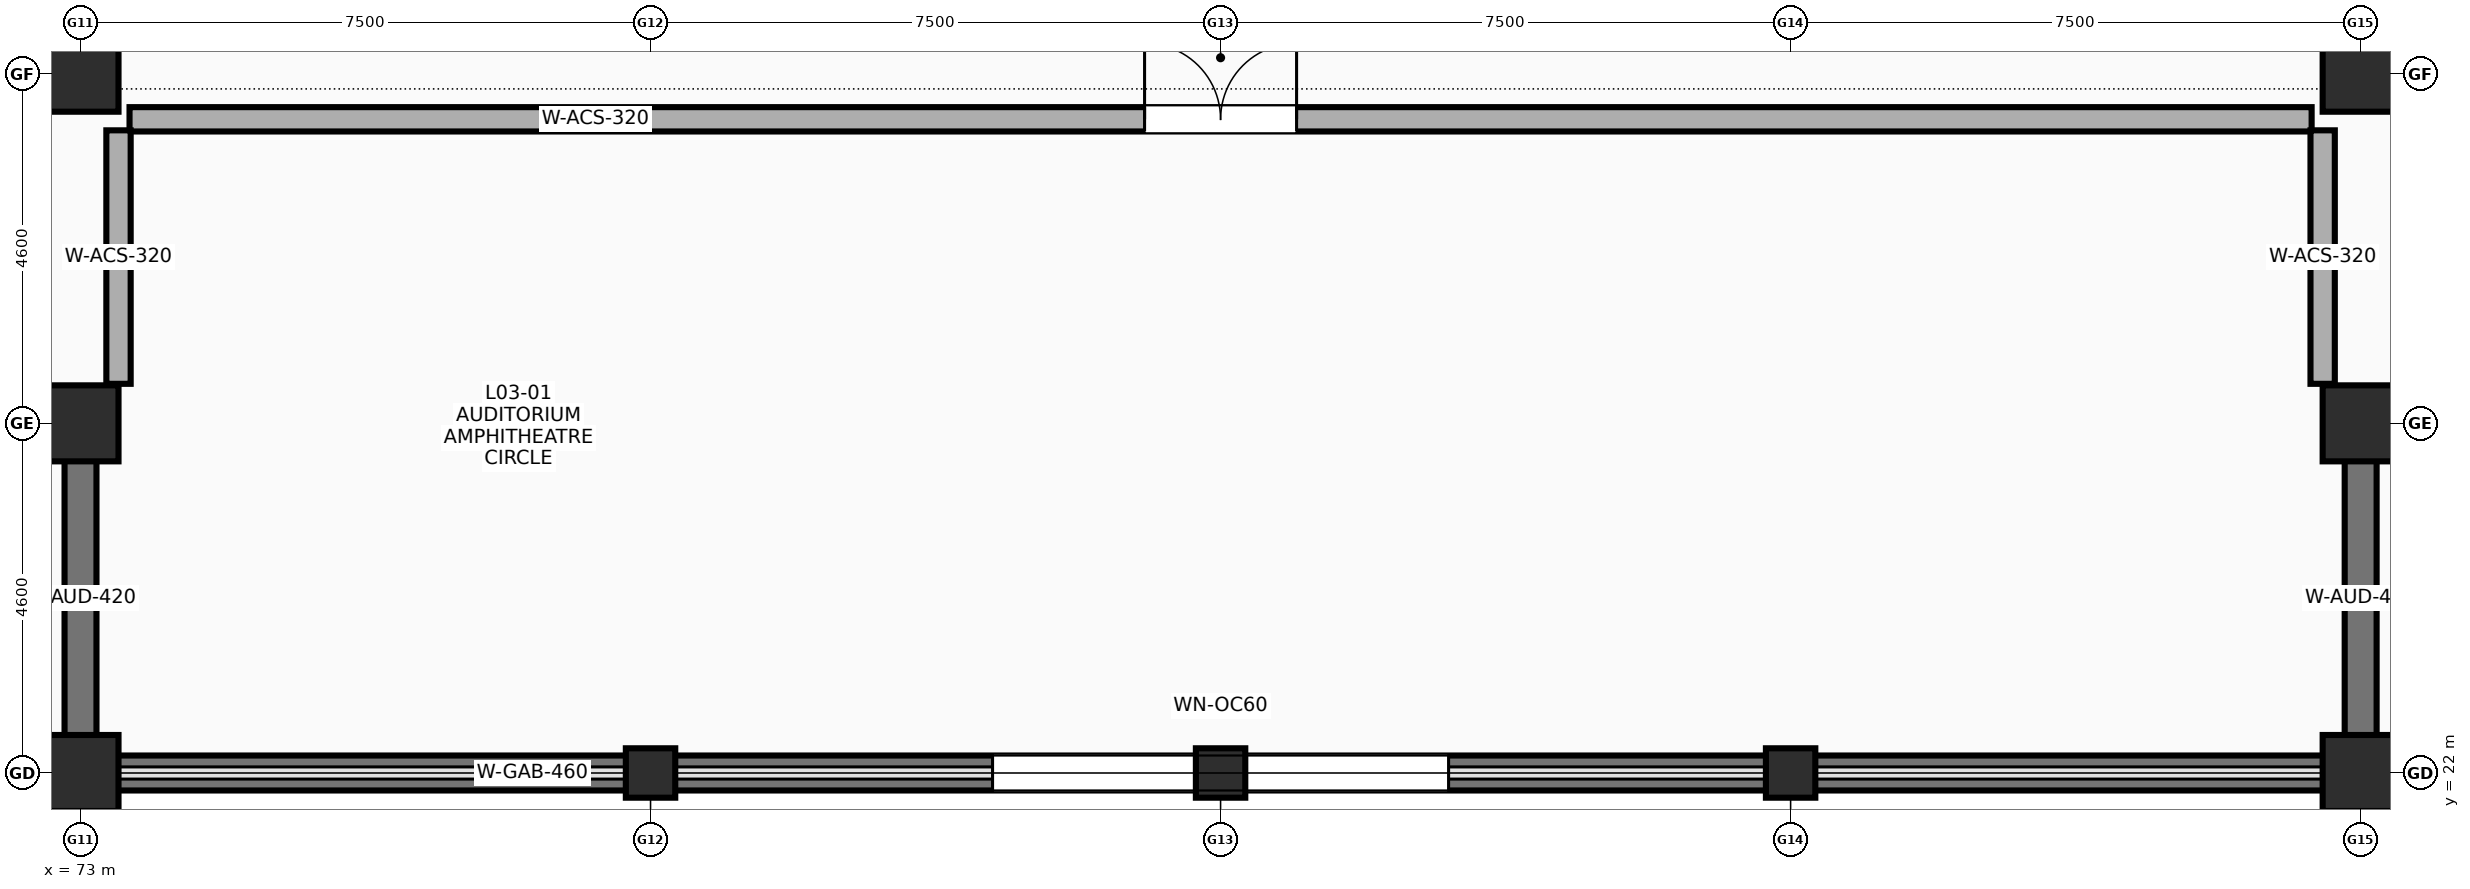
"""IFC4 building model, lengths in metres.
Left out: names, types, materials, properties, quantities, classifications, styles, units other than length and angle.
Written with IfcOpenShell. Run it as: python <this file> out.ifc"""

import sys

from ifc_helpers import new_model, si_unit, direction, frame, frame_2d, origin, origin_2d, place, context, subcontext, project, spatial, polyline, rectangle, outline, extrude, element, fill, save


model = new_model("IFC4")
c1 = context("Model", 3, precision=1e-05, world=origin(), true_north=direction((0.0, 1.0)))
c2 = subcontext(c1, "Body", "Model", "MODEL_VIEW")
j1 = project(units=[si_unit("LENGTHUNIT", "METRE"), si_unit("PLANEANGLEUNIT", "RADIAN")], contexts=[c1])
p1 = place(None, origin())
s1 = spatial("IfcSite", under=j1, at=p1, CompositionType="ELEMENT")
p2 = place(p1, origin())
s2 = spatial("IfcBuilding", under=s1, at=p2, CompositionType="ELEMENT")
p3 = place(p2, frame((0.0, 0.0, 14.2)))
s3 = spatial("IfcBuildingStorey", under=s2, at=p3, CompositionType="ELEMENT", Elevation=14.2)
for number, where, z_axis, x_axis in (
    (1, (73.0, 22.0, 0.0), (0.0, 0.0, 1.0), (1.0, 0.0, 0.0)),
    (2, (73.0, 26.6, 0.0), (0.0, 0.0, 1.0), (1.0, 0.0, 0.0)),
    (3, (73.0, 31.2, 0.0), (0.0, 0.0, 1.0), (1.0, 0.0, 0.0)),
):
    element("IfcColumn", number, at=place(p3, frame(where, z_axis=z_axis, x_axis=x_axis)), inside=s3, PredefinedType="COLUMN", context=c2, shape_type="SweptSolid", body=[
        extrude(rectangle(XDim=1.0, YDim=1.0, at=origin_2d()), origin(), (0.0, 0.0, 1.0), 3.8),
    ])
for number, where, z_axis, x_axis in (
    (4, (80.5, 22.0, 0.0), (0.0, 0.0, 1.0), (1.0, 0.0, 0.0)),
    (5, (88.0, 22.0, 0.0), (0.0, 0.0, 1.0), (1.0, 0.0, 0.0)),
    (6, (95.5, 22.0, 0.0), (0.0, 0.0, 1.0), (1.0, 0.0, 0.0)),
):
    element("IfcColumn", number, at=place(p3, frame(where, z_axis=z_axis, x_axis=x_axis)), inside=s3, PredefinedType="COLUMN", context=c2, shape_type="SweptSolid", body=[
        extrude(rectangle(XDim=0.65, YDim=0.65, at=origin_2d()), origin(), (0.0, 0.0, 1.0), 3.8),
    ])
for number, where, z_axis, x_axis in (
    (7, (103.0, 22.0, 0.0), (0.0, 0.0, 1.0), (1.0, 0.0, 0.0)),
    (8, (103.0, 26.6, 0.0), (0.0, 0.0, 1.0), (1.0, 0.0, 0.0)),
    (9, (103.0, 31.2, 0.0), (0.0, 0.0, 1.0), (1.0, 0.0, 0.0)),
):
    element("IfcColumn", number, at=place(p3, frame(where, z_axis=z_axis, x_axis=x_axis)), inside=s3, PredefinedType="COLUMN", context=c2, shape_type="SweptSolid", body=[
        extrude(rectangle(XDim=1.0, YDim=1.0, at=origin_2d()), origin(), (0.0, 0.0, 1.0), 3.8),
    ])
for number, where, z_axis, x_axis in (
    (10, (73.0, 22.49, 0.0), (0.0, 0.0, 1.0), (0.0, 1.0, 0.0)),
    (11, (103.0, 22.49, 0.0), (0.0, 0.0, 1.0), (0.0, 1.0, 0.0)),
):
    element("IfcWall", number, at=place(p3, frame(where, z_axis=z_axis, x_axis=x_axis)), inside=s3, PredefinedType="SHEAR", context=c2, shape_type="SweptSolid", body=[
        extrude(rectangle(XDim=3.62, YDim=0.42, at=frame_2d((1.81, 0.0))), origin(), (0.0, 0.0, 1.0), 3.8),
    ])
p4 = place(p3, frame((43.14, 22.0, 3.8), z_axis=(0.0, 0.0, 1.0), x_axis=(1.0, 0.0, 0.0)))
e12 = element("IfcWall", 12, at=p4, inside=s3, PredefinedType="SOLIDWALL", context=c2, shape_type="SweptSolid", body=[
    extrude(outline(polyline([(0.0, 0.0), (29.72, 0.0), (29.72, 2.177), (28.877, 3.859), (28.092, 5.46), (27.125, 6.958), (25.99, 8.333), (24.701, 9.565), (23.277, 10.637), (21.737, 11.536), (20.102, 12.248), (18.395, 12.763), (16.64, 13.076), (14.86, 13.18), (13.08, 13.076), (11.325, 12.763), (9.618, 12.248), (7.983, 11.536), (6.443, 10.637), (5.019, 9.565), (3.73, 8.333), (2.595, 6.958), (1.628, 5.46), (0.843, 3.859), (0.0, 2.177), (0.0, 0.0)])), frame((0.0, 0.23, 0.0), z_axis=(0.0, -1.0, 0.0), x_axis=(1.0, 0.0, 0.0)), (0.0, 0.0, 1.0), 0.46),
])
p5 = place(p4, frame((11.86, 0.0, 3.6)))
e13 = element("IfcOpeningElement", 13, at=p5, cuts=e12, PredefinedType="OPENING", context=c2, shape_type="SweptSolid", body=[
    extrude(outline(polyline([(6.0, 3.0), (5.898, 3.776), (5.598, 4.5), (5.121, 5.121), (4.5, 5.598), (3.776, 5.898), (3.0, 6.0), (2.224, 5.898), (1.5, 5.598), (0.879, 5.121), (0.402, 4.5), (0.102, 3.776), (0.0, 3.0), (0.102, 2.224), (0.402, 1.5), (0.879, 0.879), (1.5, 0.402), (2.224, 0.102), (3.0, 0.0), (3.776, 0.102), (4.5, 0.402), (5.121, 0.879), (5.598, 1.5), (5.898, 2.224), (6.0, 3.0)])), frame((0.0, 0.24, 0.0), z_axis=(0.0, -1.0, 0.0), x_axis=(1.0, 0.0, 0.0)), (0.0, 0.0, 1.0), 0.48),
])
p6 = place(p3, frame((73.14, 22.0, 3.8), z_axis=(0.0, 0.0, 1.0), x_axis=(1.0, 0.0, 0.0)))
e14 = element("IfcWall", 14, at=p6, inside=s3, PredefinedType="SOLIDWALL", context=c2, shape_type="SweptSolid", body=[
    extrude(outline(polyline([(0.0, 0.0), (29.72, 0.0), (29.72, 2.177), (28.877, 3.859), (28.092, 5.46), (27.125, 6.958), (25.99, 8.333), (24.701, 9.565), (23.277, 10.637), (21.737, 11.536), (20.102, 12.248), (18.395, 12.763), (16.64, 13.076), (14.86, 13.18), (13.08, 13.076), (11.325, 12.763), (9.618, 12.248), (7.983, 11.536), (6.443, 10.637), (5.019, 9.565), (3.73, 8.333), (2.595, 6.958), (1.628, 5.46), (0.843, 3.859), (0.0, 2.177), (0.0, 0.0)])), frame((0.0, 0.23, 0.0), z_axis=(0.0, -1.0, 0.0), x_axis=(1.0, 0.0, 0.0)), (0.0, 0.0, 1.0), 0.46),
])
p7 = place(p6, frame((11.86, 0.0, 3.6)))
e15 = element("IfcOpeningElement", 15, at=p7, cuts=e14, PredefinedType="OPENING", context=c2, shape_type="SweptSolid", body=[
    extrude(outline(polyline([(6.0, 3.0), (5.898, 3.776), (5.598, 4.5), (5.121, 5.121), (4.5, 5.598), (3.776, 5.898), (3.0, 6.0), (2.224, 5.898), (1.5, 5.598), (0.879, 5.121), (0.402, 4.5), (0.102, 3.776), (0.0, 3.0), (0.102, 2.224), (0.402, 1.5), (0.879, 0.879), (1.5, 0.402), (2.224, 0.102), (3.0, 0.0), (3.776, 0.102), (4.5, 0.402), (5.121, 0.879), (5.598, 1.5), (5.898, 2.224), (6.0, 3.0)])), frame((0.0, 0.24, 0.0), z_axis=(0.0, -1.0, 0.0), x_axis=(1.0, 0.0, 0.0)), (0.0, 0.0, 1.0), 0.48),
])
p8 = place(p3, frame((103.14, 22.0, 3.8), z_axis=(0.0, 0.0, 1.0), x_axis=(1.0, 0.0, 0.0)))
e16 = element("IfcWall", 16, at=p8, inside=s3, PredefinedType="SOLIDWALL", context=c2, shape_type="SweptSolid", body=[
    extrude(outline(polyline([(0.0, 0.0), (29.72, 0.0), (29.72, 2.177), (28.877, 3.859), (28.092, 5.46), (27.125, 6.958), (25.99, 8.333), (24.701, 9.565), (23.277, 10.637), (21.737, 11.536), (20.102, 12.248), (18.395, 12.763), (16.64, 13.076), (14.86, 13.18), (13.08, 13.076), (11.325, 12.763), (9.618, 12.248), (7.983, 11.536), (6.443, 10.637), (5.019, 9.565), (3.73, 8.333), (2.595, 6.958), (1.628, 5.46), (0.843, 3.859), (0.0, 2.177), (0.0, 0.0)])), frame((0.0, 0.23, 0.0), z_axis=(0.0, -1.0, 0.0), x_axis=(1.0, 0.0, 0.0)), (0.0, 0.0, 1.0), 0.46),
])
p9 = place(p8, frame((11.86, 0.0, 3.6)))
e17 = element("IfcOpeningElement", 17, at=p9, cuts=e16, PredefinedType="OPENING", context=c2, shape_type="SweptSolid", body=[
    extrude(outline(polyline([(6.0, 3.0), (5.898, 3.776), (5.598, 4.5), (5.121, 5.121), (4.5, 5.598), (3.776, 5.898), (3.0, 6.0), (2.224, 5.898), (1.5, 5.598), (0.879, 5.121), (0.402, 4.5), (0.102, 3.776), (0.0, 3.0), (0.102, 2.224), (0.402, 1.5), (0.879, 0.879), (1.5, 0.402), (2.224, 0.102), (3.0, 0.0), (3.776, 0.102), (4.5, 0.402), (5.121, 0.879), (5.598, 1.5), (5.898, 2.224), (6.0, 3.0)])), frame((0.0, 0.24, 0.0), z_axis=(0.0, -1.0, 0.0), x_axis=(1.0, 0.0, 0.0)), (0.0, 0.0, 1.0), 0.48),
])
p10 = place(p3, frame((73.645, 30.6, 0.0), z_axis=(0.0, 0.0, 1.0), x_axis=(1.0, 0.0, 0.0)))
e18 = element("IfcWall", 18, at=p10, inside=s3, PredefinedType="PARTITIONING", context=c2, shape_type="SweptSolid", body=[
    extrude(rectangle(XDim=28.71, YDim=0.32, at=frame_2d((14.355, 0.0))), origin(), (0.0, 0.0, 1.0), 2.38),
])
p11 = place(p10, frame((13.355, 0.0, 0.0)))
e19 = element("IfcOpeningElement", 19, at=p11, cuts=e18, PredefinedType="OPENING", context=c2, shape_type="SweptSolid", body=[
    extrude(rectangle(XDim=2.0, YDim=2.15, at=frame_2d((1.0, 1.075))), frame((0.0, 0.17, 0.0), z_axis=(0.0, -1.0, 0.0), x_axis=(1.0, 0.0, 0.0)), (0.0, 0.0, 1.0), 0.34),
])
for number, where, z_axis, x_axis in (
    (20, (73.5, 27.12, 0.0), (0.0, 0.0, 1.0), (0.0, 1.0, 0.0)),
    (21, (102.5, 27.12, 0.0), (0.0, 0.0, 1.0), (0.0, 1.0, 0.0)),
):
    element("IfcWall", number, at=place(p3, frame(where, z_axis=z_axis, x_axis=x_axis)), inside=s3, PredefinedType="PARTITIONING", context=c2, shape_type="SweptSolid", body=[
        extrude(rectangle(XDim=3.335, YDim=0.32, at=frame_2d((1.667, 0.0))), origin(), (0.0, 0.0, 1.0), 2.38),
    ])
p12 = place(p7, origin())
e22 = element("IfcWindow", 22, at=p12, inside=s3, PartitioningType="SINGLE_PANEL", PredefinedType="WINDOW", context=c2, shape_type="SweptSolid", body=[
    extrude(outline(polyline([(6.0, 3.0), (5.898, 3.776), (5.598, 4.5), (5.121, 5.121), (4.5, 5.598), (3.776, 5.898), (3.0, 6.0), (2.224, 5.898), (1.5, 5.598), (0.879, 5.121), (0.402, 4.5), (0.102, 3.776), (0.0, 3.0), (0.102, 2.224), (0.402, 1.5), (0.879, 0.879), (1.5, 0.402), (2.224, 0.102), (3.0, 0.0), (3.776, 0.102), (4.5, 0.402), (5.121, 0.879), (5.598, 1.5), (5.898, 2.224), (6.0, 3.0)])), frame((0.0, 0.03, 0.0), z_axis=(0.0, -1.0, 0.0), x_axis=(1.0, 0.0, 0.0)), (0.0, 0.0, 1.0), 0.06),
])
fill(e15, e22)
p13 = place(p11, origin())
e23 = element("IfcDoor", 23, at=p13, inside=s3, OperationType="DOUBLE_DOOR_SINGLE_SWING", PredefinedType="DOOR", context=c2, shape_type="SweptSolid", body=[
    extrude(rectangle(XDim=2.0, YDim=2.15, at=frame_2d((1.0, 1.075))), frame((0.0, 0.025, 0.0), z_axis=(0.0, -1.0, 0.0), x_axis=(1.0, 0.0, 0.0)), (0.0, 0.0, 1.0), 0.05),
])
fill(e19, e23)
save(model, sys.argv[1])
